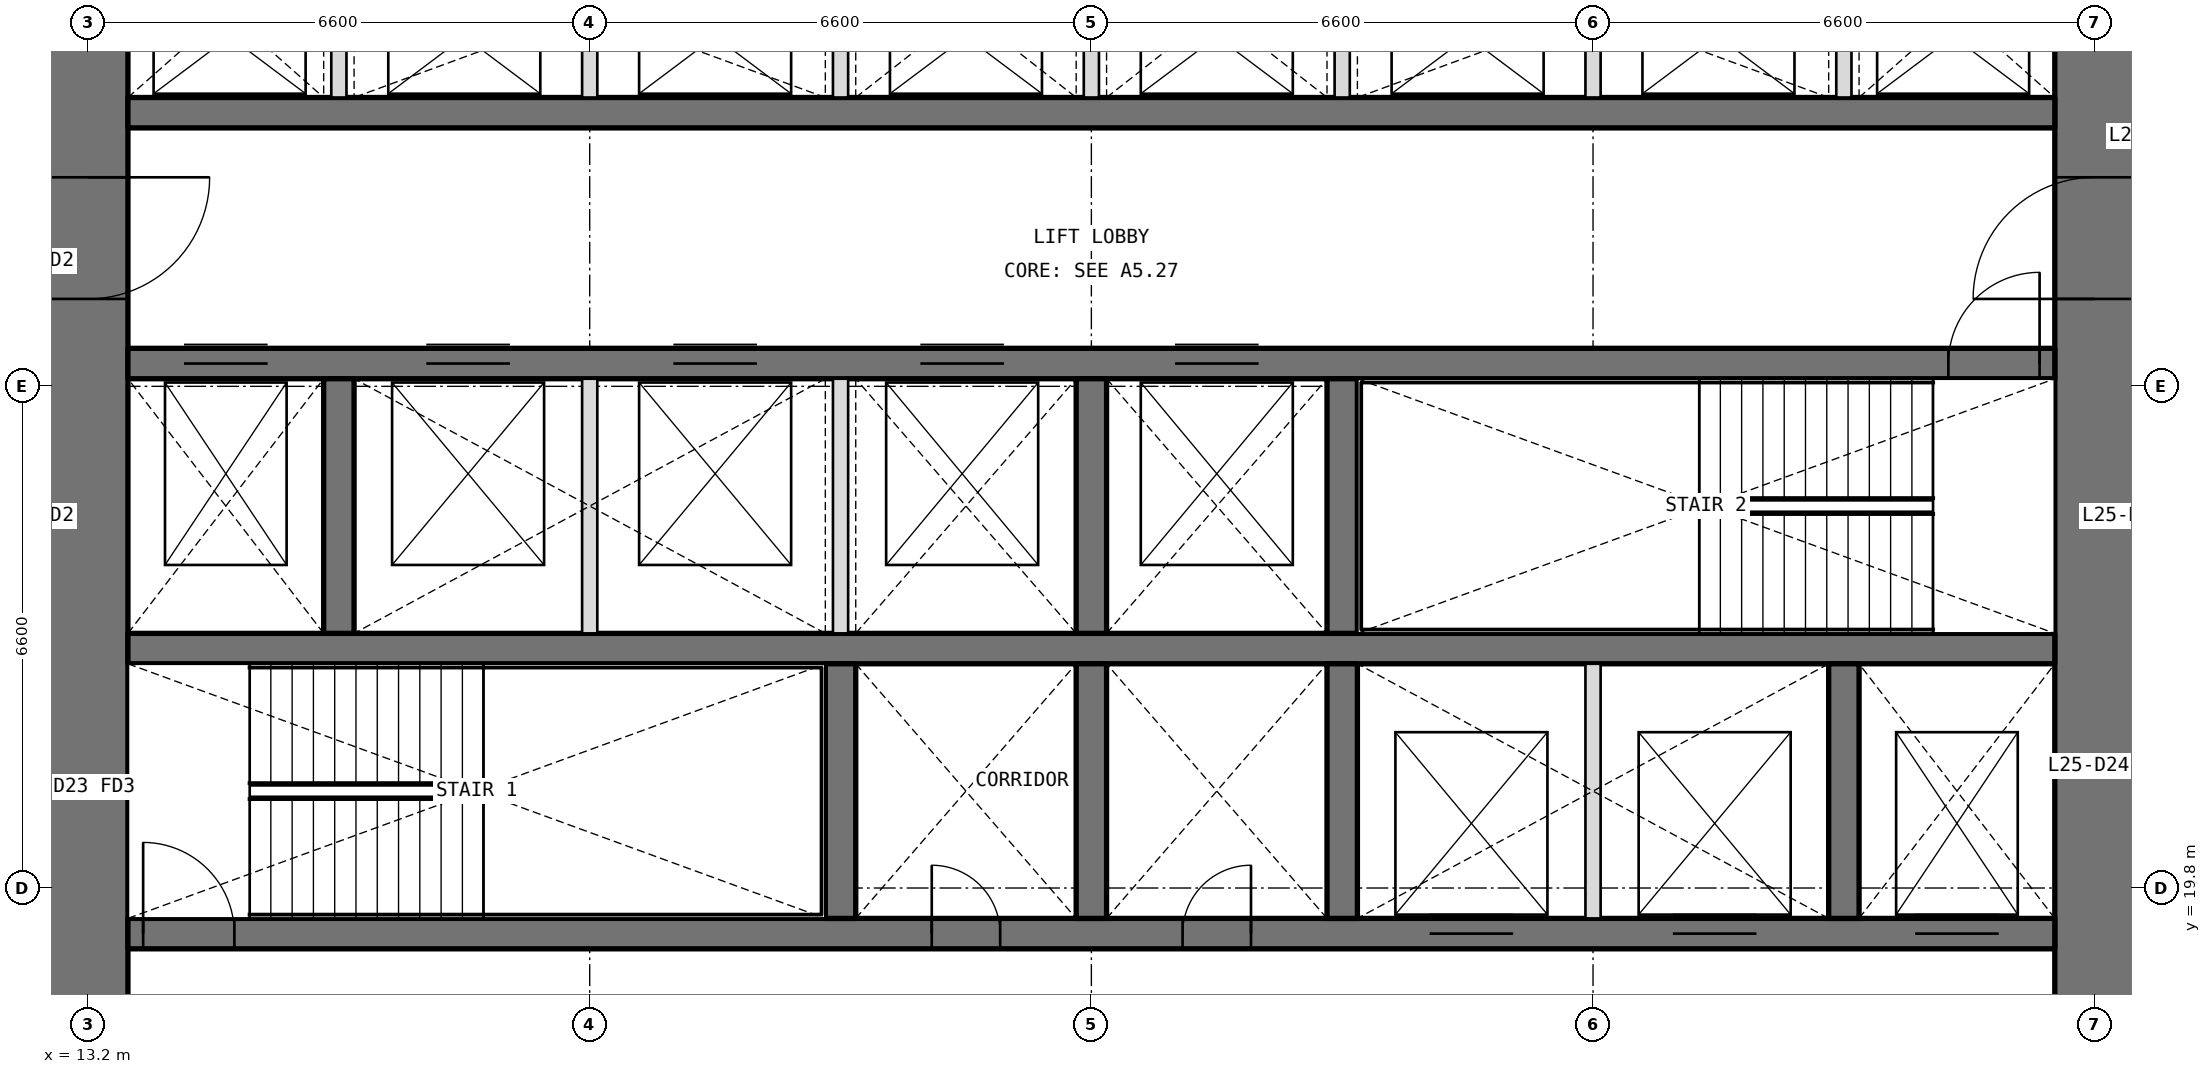
"""IFC4 building model, lengths in metres.
Left out: names, types, materials, properties, quantities, classifications, styles, units other than length and angle.
Written with IfcOpenShell. Run it as: python <this file> out.ifc"""

import sys

from ifc_helpers import new_model, si_unit, direction, frame, frame_2d, origin, place, context, subcontext, project, spatial, rectangle, extrude, element, fill, save


model = new_model("IFC4")
c1 = context("Model", 3, precision=1e-05, world=origin(), true_north=direction((0.0, 1.0)))
c2 = subcontext(c1, "Body", "Model", "MODEL_VIEW")
j1 = project(units=[si_unit("LENGTHUNIT", "METRE"), si_unit("PLANEANGLEUNIT", "RADIAN")], contexts=[c1])
p1 = place(None, origin())
s1 = spatial("IfcSite", under=j1, at=p1, CompositionType="ELEMENT")
p2 = place(p1, origin())
s2 = spatial("IfcBuilding", under=s1, at=p2, CompositionType="ELEMENT")
p3 = place(p2, frame((0.0, 0.0, 111.6)))
s3 = spatial("IfcBuildingStorey", under=s2, at=p3, CompositionType="ELEMENT", Elevation=111.6)
p4 = place(p3, frame((39.6, 13.725, 0.0), z_axis=(0.0, 0.0, 1.0), x_axis=(0.0, 1.0, 0.0)))
e1 = element("IfcWall", 1, at=p4, inside=s3, PredefinedType="SHEAR", context=c2, shape_type="SweptSolid", body=[
    extrude(rectangle(XDim=18.75, YDim=1.05, at=frame_2d((9.375, 0.0))), origin(), (0.0, 0.0, 1.0), 4.2),
])
p5 = place(p4, frame((3.025, 0.0, 0.0)))
e2 = element("IfcOpeningElement", 2, at=p5, cuts=e1, PredefinedType="OPENING", context=c2, shape_type="SweptSolid", body=[
    extrude(rectangle(XDim=1.6, YDim=2.1, at=frame_2d((0.8, 1.05))), frame((0.0, 0.535, 0.0), z_axis=(0.0, -1.0, 0.0), x_axis=(1.0, 0.0, 0.0)), (0.0, 0.0, 1.0), 1.07),
])
p6 = place(p4, frame((13.825, 0.0, 0.0)))
e3 = element("IfcOpeningElement", 3, at=p6, cuts=e1, PredefinedType="OPENING", context=c2, shape_type="SweptSolid", body=[
    extrude(rectangle(XDim=1.6, YDim=2.1, at=frame_2d((0.8, 1.05))), frame((0.0, 0.535, 0.0), z_axis=(0.0, -1.0, 0.0), x_axis=(1.0, 0.0, 0.0)), (0.0, 0.0, 1.0), 1.07),
])
p7 = place(p3, frame((13.2, 32.475, 0.0), z_axis=(0.0, 0.0, 1.0), x_axis=(0.0, -1.0, 0.0)))
e4 = element("IfcWall", 4, at=p7, inside=s3, PredefinedType="SHEAR", context=c2, shape_type="SweptSolid", body=[
    extrude(rectangle(XDim=18.75, YDim=1.05, at=frame_2d((9.375, 0.0))), origin(), (0.0, 0.0, 1.0), 4.2),
])
p8 = place(p7, frame((14.125, 0.0, 0.0)))
e5 = element("IfcOpeningElement", 5, at=p8, cuts=e4, PredefinedType="OPENING", context=c2, shape_type="SweptSolid", body=[
    extrude(rectangle(XDim=1.6, YDim=2.1, at=frame_2d((0.8, 1.05))), frame((0.0, 0.535, 0.0), z_axis=(0.0, -1.0, 0.0), x_axis=(1.0, 0.0, 0.0)), (0.0, 0.0, 1.0), 1.07),
])
p9 = place(p7, frame((3.325, 0.0, 0.0)))
e6 = element("IfcOpeningElement", 6, at=p9, cuts=e4, PredefinedType="OPENING", context=c2, shape_type="SweptSolid", body=[
    extrude(rectangle(XDim=1.6, YDim=2.1, at=frame_2d((0.8, 1.05))), frame((0.0, 0.535, 0.0), z_axis=(0.0, -1.0, 0.0), x_axis=(1.0, 0.0, 0.0)), (0.0, 0.0, 1.0), 1.07),
])
p10 = place(p3, frame((13.725, 19.2, 0.0), z_axis=(0.0, 0.0, 1.0), x_axis=(1.0, 0.0, 0.0)))
e7 = element("IfcWall", 7, at=p10, inside=s3, PredefinedType="SHEAR", context=c2, shape_type="SweptSolid", body=[
    extrude(rectangle(XDim=25.35, YDim=0.4, at=frame_2d((12.675, 0.0))), origin(), (0.0, 0.0, 1.0), 4.2),
])
p11 = place(p10, frame((10.575, 0.0, 0.0)))
e8 = element("IfcOpeningElement", 8, at=p11, cuts=e7, PredefinedType="OPENING", context=c2, shape_type="SweptSolid", body=[
    extrude(rectangle(XDim=0.9, YDim=2.1, at=frame_2d((0.45, 1.05))), frame((0.0, 0.21, 0.0), z_axis=(0.0, -1.0, 0.0), x_axis=(1.0, 0.0, 0.0)), (0.0, 0.0, 1.0), 0.42),
])
p12 = place(p10, frame((13.875, 0.0, 0.0)))
e9 = element("IfcOpeningElement", 9, at=p12, cuts=e7, PredefinedType="OPENING", context=c2, shape_type="SweptSolid", body=[
    extrude(rectangle(XDim=0.9, YDim=2.1, at=frame_2d((0.45, 1.05))), frame((0.0, 0.21, 0.0), z_axis=(0.0, -1.0, 0.0), x_axis=(1.0, 0.0, 0.0)), (0.0, 0.0, 1.0), 0.42),
])
p13 = place(p10, frame((0.2, 0.0, 0.0)))
e10 = element("IfcOpeningElement", 10, at=p13, cuts=e7, PredefinedType="OPENING", context=c2, shape_type="SweptSolid", body=[
    extrude(rectangle(XDim=1.2, YDim=2.1, at=frame_2d((0.6, 1.05))), frame((0.0, 0.21, 0.0), z_axis=(0.0, -1.0, 0.0), x_axis=(1.0, 0.0, 0.0)), (0.0, 0.0, 1.0), 0.42),
])
p14 = place(p10, frame((23.512, 0.0, 0.0)))
e11 = element("IfcOpeningElement", 11, at=p14, cuts=e7, PredefinedType="OPENING", context=c2, shape_type="SweptSolid", body=[
    extrude(rectangle(XDim=1.1, YDim=2.1, at=frame_2d((0.55, 1.05))), frame((0.0, 0.21, 0.0), z_axis=(0.0, -1.0, 0.0), x_axis=(1.0, 0.0, 0.0)), (0.0, 0.0, 1.0), 0.42),
])
p15 = place(p10, frame((17.125, 0.0, 0.0)))
e12 = element("IfcOpeningElement", 12, at=p15, cuts=e7, PredefinedType="OPENING", context=c2, shape_type="SweptSolid", body=[
    extrude(rectangle(XDim=1.1, YDim=2.1, at=frame_2d((0.55, 1.05))), frame((0.0, 0.21, 0.0), z_axis=(0.0, -1.0, 0.0), x_axis=(1.0, 0.0, 0.0)), (0.0, 0.0, 1.0), 0.42),
])
p16 = place(p10, frame((20.325, 0.0, 0.0)))
e13 = element("IfcOpeningElement", 13, at=p16, cuts=e7, PredefinedType="OPENING", context=c2, shape_type="SweptSolid", body=[
    extrude(rectangle(XDim=1.1, YDim=2.1, at=frame_2d((0.55, 1.05))), frame((0.0, 0.21, 0.0), z_axis=(0.0, -1.0, 0.0), x_axis=(1.0, 0.0, 0.0)), (0.0, 0.0, 1.0), 0.42),
])
p17 = place(p3, frame((13.725, 22.95, 0.0), z_axis=(0.0, 0.0, 1.0), x_axis=(1.0, 0.0, 0.0)))
e14 = element("IfcWall", 14, at=p17, inside=s3, PredefinedType="SHEAR", context=c2, shape_type="SweptSolid", body=[
    extrude(rectangle(XDim=25.35, YDim=0.4, at=frame_2d((12.675, 0.0))), origin(), (0.0, 0.0, 1.0), 4.2),
])
p18 = place(p3, frame((13.725, 26.7, 0.0), z_axis=(0.0, 0.0, 1.0), x_axis=(1.0, 0.0, 0.0)))
e15 = element("IfcWall", 15, at=p18, inside=s3, PredefinedType="SHEAR", context=c2, shape_type="SweptSolid", body=[
    extrude(rectangle(XDim=25.35, YDim=0.4, at=frame_2d((12.675, 0.0))), origin(), (0.0, 0.0, 1.0), 4.2),
])
p19 = place(p18, frame((23.95, 0.0, 0.0)))
e16 = element("IfcOpeningElement", 16, at=p19, cuts=e15, PredefinedType="OPENING", context=c2, shape_type="SweptSolid", body=[
    extrude(rectangle(XDim=1.2, YDim=2.1, at=frame_2d((0.6, 1.05))), frame((0.0, 0.21, 0.0), z_axis=(0.0, -1.0, 0.0), x_axis=(1.0, 0.0, 0.0)), (0.0, 0.0, 1.0), 0.42),
])
p20 = place(p18, frame((0.738, 0.0, 0.0)))
e17 = element("IfcOpeningElement", 17, at=p20, cuts=e15, PredefinedType="OPENING", context=c2, shape_type="SweptSolid", body=[
    extrude(rectangle(XDim=1.1, YDim=2.1, at=frame_2d((0.55, 1.05))), frame((0.0, 0.21, 0.0), z_axis=(0.0, -1.0, 0.0), x_axis=(1.0, 0.0, 0.0)), (0.0, 0.0, 1.0), 0.42),
])
p21 = place(p18, frame((3.925, 0.0, 0.0)))
e18 = element("IfcOpeningElement", 18, at=p21, cuts=e15, PredefinedType="OPENING", context=c2, shape_type="SweptSolid", body=[
    extrude(rectangle(XDim=1.1, YDim=2.1, at=frame_2d((0.55, 1.05))), frame((0.0, 0.21, 0.0), z_axis=(0.0, -1.0, 0.0), x_axis=(1.0, 0.0, 0.0)), (0.0, 0.0, 1.0), 0.42),
])
p22 = place(p18, frame((7.175, 0.0, 0.0)))
e19 = element("IfcOpeningElement", 19, at=p22, cuts=e15, PredefinedType="OPENING", context=c2, shape_type="SweptSolid", body=[
    extrude(rectangle(XDim=1.1, YDim=2.1, at=frame_2d((0.55, 1.05))), frame((0.0, 0.21, 0.0), z_axis=(0.0, -1.0, 0.0), x_axis=(1.0, 0.0, 0.0)), (0.0, 0.0, 1.0), 0.42),
])
p23 = place(p18, frame((10.425, 0.0, 0.0)))
e20 = element("IfcOpeningElement", 20, at=p23, cuts=e15, PredefinedType="OPENING", context=c2, shape_type="SweptSolid", body=[
    extrude(rectangle(XDim=1.1, YDim=2.1, at=frame_2d((0.55, 1.05))), frame((0.0, 0.21, 0.0), z_axis=(0.0, -1.0, 0.0), x_axis=(1.0, 0.0, 0.0)), (0.0, 0.0, 1.0), 0.42),
])
p24 = place(p18, frame((13.775, 0.0, 0.0)))
e21 = element("IfcOpeningElement", 21, at=p24, cuts=e15, PredefinedType="OPENING", context=c2, shape_type="SweptSolid", body=[
    extrude(rectangle(XDim=1.1, YDim=2.1, at=frame_2d((0.55, 1.05))), frame((0.0, 0.21, 0.0), z_axis=(0.0, -1.0, 0.0), x_axis=(1.0, 0.0, 0.0)), (0.0, 0.0, 1.0), 0.42),
])
p25 = place(p3, frame((13.725, 30.0, 0.0), z_axis=(0.0, 0.0, 1.0), x_axis=(1.0, 0.0, 0.0)))
e22 = element("IfcWall", 22, at=p25, inside=s3, PredefinedType="SHEAR", context=c2, shape_type="SweptSolid", body=[
    extrude(rectangle(XDim=25.35, YDim=0.4, at=frame_2d((12.675, 0.0))), origin(), (0.0, 0.0, 1.0), 4.2),
])
for number, where, z_axis, x_axis in (
    (23, (23.1, 19.4, 0.0), (0.0, 0.0, 1.0), (0.0, 1.0, 0.0)),
    (24, (26.4, 19.4, 0.0), (0.0, 0.0, 1.0), (0.0, 1.0, 0.0)),
    (25, (29.7, 19.4, 0.0), (0.0, 0.0, 1.0), (0.0, 1.0, 0.0)),
    (26, (36.3, 19.4, 0.0), (0.0, 0.0, 1.0), (0.0, 1.0, 0.0)),
    (27, (16.5, 23.15, 0.0), (0.0, 0.0, 1.0), (0.0, 1.0, 0.0)),
    (28, (26.4, 23.15, 0.0), (0.0, 0.0, 1.0), (0.0, 1.0, 0.0)),
    (29, (29.7, 23.15, 0.0), (0.0, 0.0, 1.0), (0.0, 1.0, 0.0)),
):
    element("IfcWall", number, at=place(p3, frame(where, z_axis=z_axis, x_axis=x_axis)), inside=s3, PredefinedType="SHEAR", context=c2, shape_type="SweptSolid", body=[
        extrude(rectangle(XDim=3.35, YDim=0.4, at=frame_2d((1.675, 0.0))), origin(), (0.0, 0.0, 1.0), 4.2),
    ])
for number, where, z_axis, x_axis in (
    (30, (16.5, 30.2, 0.0), (0.0, 0.0, 1.0), (0.0, 1.0, 0.0)),
    (31, (19.8, 30.2, 0.0), (0.0, 0.0, 1.0), (0.0, 1.0, 0.0)),
    (32, (23.1, 30.2, 0.0), (0.0, 0.0, 1.0), (0.0, 1.0, 0.0)),
    (33, (26.4, 30.2, 0.0), (0.0, 0.0, 1.0), (0.0, 1.0, 0.0)),
    (34, (29.7, 30.2, 0.0), (0.0, 0.0, 1.0), (0.0, 1.0, 0.0)),
    (35, (33.0, 30.2, 0.0), (0.0, 0.0, 1.0), (0.0, 1.0, 0.0)),
    (36, (36.3, 30.2, 0.0), (0.0, 0.0, 1.0), (0.0, 1.0, 0.0)),
):
    element("IfcWall", number, at=place(p3, frame(where, z_axis=z_axis, x_axis=x_axis)), inside=s3, PredefinedType="PARTITIONING", context=c2, shape_type="SweptSolid", body=[
        extrude(rectangle(XDim=2.275, YDim=0.2, at=frame_2d((1.138, 0.0))), origin(), (0.0, 0.0, 1.0), 4.2),
    ])
for number, where, z_axis, x_axis in (
    (37, (33.0, 19.4, 0.0), (0.0, 0.0, 1.0), (0.0, 1.0, 0.0)),
    (38, (19.8, 23.15, 0.0), (0.0, 0.0, 1.0), (0.0, 1.0, 0.0)),
    (39, (23.1, 23.15, 0.0), (0.0, 0.0, 1.0), (0.0, 1.0, 0.0)),
):
    element("IfcWall", number, at=place(p3, frame(where, z_axis=z_axis, x_axis=x_axis)), inside=s3, PredefinedType="PARTITIONING", context=c2, shape_type="SweptSolid", body=[
        extrude(rectangle(XDim=3.35, YDim=0.2, at=frame_2d((1.675, 0.0))), origin(), (0.0, 0.0, 1.0), 4.2),
    ])
p26 = place(p11, origin())
e40 = element("IfcDoor", 40, at=p26, inside=s3, OperationType="SINGLE_SWING_LEFT", PredefinedType="DOOR", context=c2, shape_type="SweptSolid", body=[
    extrude(rectangle(XDim=0.9, YDim=2.1, at=frame_2d((0.45, 1.05))), frame((0.0, 0.025, 0.0), z_axis=(0.0, -1.0, 0.0), x_axis=(1.0, 0.0, 0.0)), (0.0, 0.0, 1.0), 0.05),
])
fill(e8, e40)
p27 = place(p12, origin())
e41 = element("IfcDoor", 41, at=p27, inside=s3, OperationType="SINGLE_SWING_RIGHT", PredefinedType="DOOR", context=c2, shape_type="SweptSolid", body=[
    extrude(rectangle(XDim=0.9, YDim=2.1, at=frame_2d((0.45, 1.05))), frame((0.0, 0.025, 0.0), z_axis=(0.0, -1.0, 0.0), x_axis=(1.0, 0.0, 0.0)), (0.0, 0.0, 1.0), 0.05),
])
fill(e9, e41)
p28 = place(p13, origin())
e42 = element("IfcDoor", 42, at=p28, inside=s3, OperationType="SINGLE_SWING_LEFT", PredefinedType="DOOR", context=c2, shape_type="SweptSolid", body=[
    extrude(rectangle(XDim=1.2, YDim=2.1, at=frame_2d((0.6, 1.05))), frame((0.0, 0.025, 0.0), z_axis=(0.0, -1.0, 0.0), x_axis=(1.0, 0.0, 0.0)), (0.0, 0.0, 1.0), 0.05),
])
fill(e10, e42)
p29 = place(p19, origin())
e43 = element("IfcDoor", 43, at=p29, inside=s3, OperationType="SINGLE_SWING_RIGHT", PredefinedType="DOOR", context=c2, shape_type="SweptSolid", body=[
    extrude(rectangle(XDim=1.2, YDim=2.1, at=frame_2d((0.6, 1.05))), frame((0.0, 0.025, 0.0), z_axis=(0.0, -1.0, 0.0), x_axis=(1.0, 0.0, 0.0)), (0.0, 0.0, 1.0), 0.05),
])
fill(e16, e43)
p30 = place(p9, origin())
e44 = element("IfcDoor", 44, at=p30, inside=s3, OperationType="DOUBLE_DOOR_DOUBLE_SWING", PredefinedType="DOOR", context=c2, shape_type="SweptSolid", body=[
    extrude(rectangle(XDim=1.6, YDim=2.1, at=frame_2d((0.8, 1.05))), frame((0.0, 0.025, 0.0), z_axis=(0.0, -1.0, 0.0), x_axis=(1.0, 0.0, 0.0)), (0.0, 0.0, 1.0), 0.05),
])
fill(e6, e44)
p31 = place(p6, origin())
e45 = element("IfcDoor", 45, at=p31, inside=s3, OperationType="DOUBLE_DOOR_DOUBLE_SWING", PredefinedType="DOOR", context=c2, shape_type="SweptSolid", body=[
    extrude(rectangle(XDim=1.6, YDim=2.1, at=frame_2d((0.8, 1.05))), frame((0.0, 0.025, 0.0), z_axis=(0.0, -1.0, 0.0), x_axis=(1.0, 0.0, 0.0)), (0.0, 0.0, 1.0), 0.05),
])
fill(e3, e45)
p32 = place(p20, origin())
e46 = element("IfcDoor", 46, at=p32, inside=s3, OperationType="DOUBLE_DOOR_SLIDING", PredefinedType="DOOR", context=c2, shape_type="SweptSolid", body=[
    extrude(rectangle(XDim=1.1, YDim=2.1, at=frame_2d((0.55, 1.05))), frame((0.0, 0.025, 0.0), z_axis=(0.0, -1.0, 0.0), x_axis=(1.0, 0.0, 0.0)), (0.0, 0.0, 1.0), 0.05),
])
fill(e17, e46)
p33 = place(p14, origin())
e47 = element("IfcDoor", 47, at=p33, inside=s3, OperationType="DOUBLE_DOOR_SLIDING", PredefinedType="DOOR", context=c2, shape_type="SweptSolid", body=[
    extrude(rectangle(XDim=1.1, YDim=2.1, at=frame_2d((0.55, 1.05))), frame((0.0, 0.025, 0.0), z_axis=(0.0, -1.0, 0.0), x_axis=(1.0, 0.0, 0.0)), (0.0, 0.0, 1.0), 0.05),
])
fill(e11, e47)
p34 = place(p15, origin())
e48 = element("IfcDoor", 48, at=p34, inside=s3, OperationType="DOUBLE_DOOR_SLIDING", PredefinedType="DOOR", context=c2, shape_type="SweptSolid", body=[
    extrude(rectangle(XDim=1.1, YDim=2.1, at=frame_2d((0.55, 1.05))), frame((0.0, 0.025, 0.0), z_axis=(0.0, -1.0, 0.0), x_axis=(1.0, 0.0, 0.0)), (0.0, 0.0, 1.0), 0.05),
])
fill(e12, e48)
p35 = place(p16, origin())
e49 = element("IfcDoor", 49, at=p35, inside=s3, OperationType="DOUBLE_DOOR_SLIDING", PredefinedType="DOOR", context=c2, shape_type="SweptSolid", body=[
    extrude(rectangle(XDim=1.1, YDim=2.1, at=frame_2d((0.55, 1.05))), frame((0.0, 0.025, 0.0), z_axis=(0.0, -1.0, 0.0), x_axis=(1.0, 0.0, 0.0)), (0.0, 0.0, 1.0), 0.05),
])
fill(e13, e49)
p36 = place(p21, origin())
e50 = element("IfcDoor", 50, at=p36, inside=s3, OperationType="DOUBLE_DOOR_SLIDING", PredefinedType="DOOR", context=c2, shape_type="SweptSolid", body=[
    extrude(rectangle(XDim=1.1, YDim=2.1, at=frame_2d((0.55, 1.05))), frame((0.0, 0.025, 0.0), z_axis=(0.0, -1.0, 0.0), x_axis=(1.0, 0.0, 0.0)), (0.0, 0.0, 1.0), 0.05),
])
fill(e18, e50)
p37 = place(p22, origin())
e51 = element("IfcDoor", 51, at=p37, inside=s3, OperationType="DOUBLE_DOOR_SLIDING", PredefinedType="DOOR", context=c2, shape_type="SweptSolid", body=[
    extrude(rectangle(XDim=1.1, YDim=2.1, at=frame_2d((0.55, 1.05))), frame((0.0, 0.025, 0.0), z_axis=(0.0, -1.0, 0.0), x_axis=(1.0, 0.0, 0.0)), (0.0, 0.0, 1.0), 0.05),
])
fill(e19, e51)
p38 = place(p23, origin())
e52 = element("IfcDoor", 52, at=p38, inside=s3, OperationType="DOUBLE_DOOR_SLIDING", PredefinedType="DOOR", context=c2, shape_type="SweptSolid", body=[
    extrude(rectangle(XDim=1.1, YDim=2.1, at=frame_2d((0.55, 1.05))), frame((0.0, 0.025, 0.0), z_axis=(0.0, -1.0, 0.0), x_axis=(1.0, 0.0, 0.0)), (0.0, 0.0, 1.0), 0.05),
])
fill(e20, e52)
p39 = place(p24, origin())
e53 = element("IfcDoor", 53, at=p39, inside=s3, OperationType="DOUBLE_DOOR_SLIDING", PredefinedType="DOOR", context=c2, shape_type="SweptSolid", body=[
    extrude(rectangle(XDim=1.1, YDim=2.1, at=frame_2d((0.55, 1.05))), frame((0.0, 0.025, 0.0), z_axis=(0.0, -1.0, 0.0), x_axis=(1.0, 0.0, 0.0)), (0.0, 0.0, 1.0), 0.05),
])
fill(e21, e53)
save(model, sys.argv[1])
